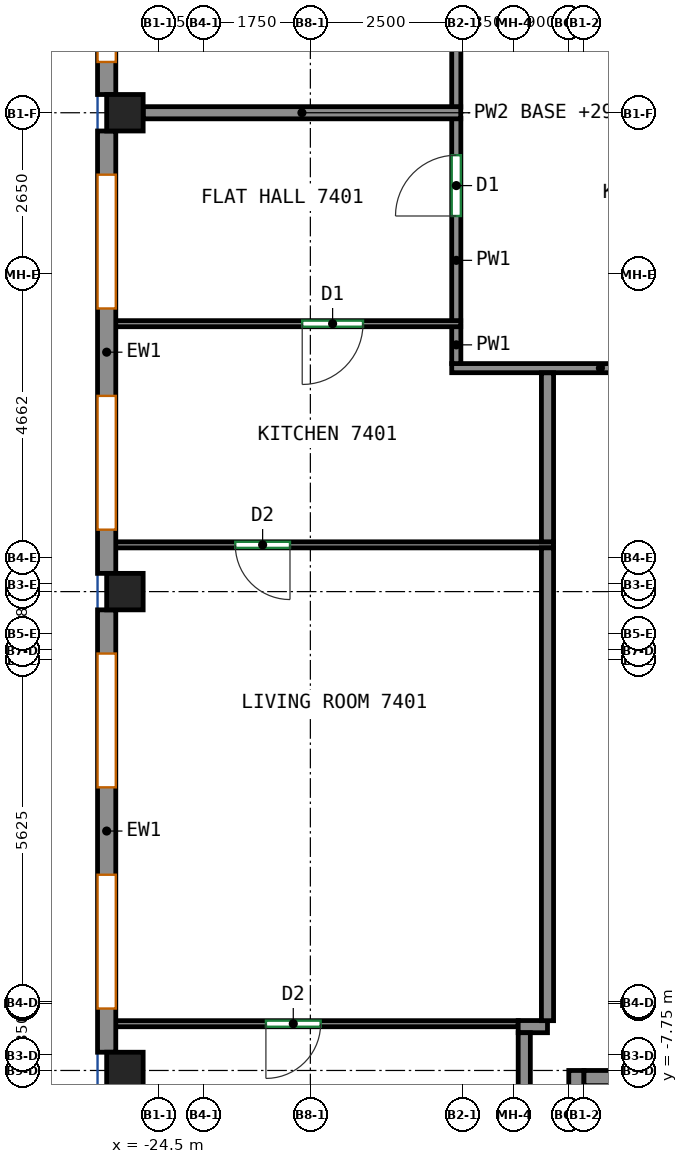
"""IFC4 building model, lengths in metres.
Left out: names, types, materials, properties, quantities, classifications, styles, units other than length and angle.
Written with IfcOpenShell. Run it as: python <this file> out.ifc"""

import sys

from ifc_helpers import new_model, si_unit, direction, frame, frame_2d, origin, origin_2d, place, context, subcontext, project, spatial, rectangle, extrude, source, transform, mapped, element, fill, save


model = new_model("IFC4")
c1 = context("Model", 3, precision=1e-05, world=origin(), true_north=direction((0.0, 1.0)))
c2 = subcontext(c1, "Body", "Model", "MODEL_VIEW")
j1 = project(units=[si_unit("LENGTHUNIT", "METRE"), si_unit("PLANEANGLEUNIT", "RADIAN")], contexts=[c1])
p1 = place(None, origin())
s1 = spatial("IfcSite", under=j1, at=p1, CompositionType="ELEMENT")
p2 = place(p1, origin())
s2 = spatial("IfcBuilding", under=s1, at=p2, CompositionType="ELEMENT")
p3 = place(p2, frame((0.0, 0.0, 298.4)))
s3 = spatial("IfcBuildingStorey", under=s2, at=p3, CompositionType="ELEMENT", Elevation=298.4)
m1 = source(origin(), c2, "Body", "SweptSolid", [
    extrude(rectangle(XDim=0.6, YDim=0.6, at=origin_2d()), origin(), (0.0, 0.0, 1.0), 3.12),
])
for number, where, z_axis, x_axis in (
    (1, (-25.05, -7.75, 0.0), (0.0, 0.0, 1.0), (1.0, 0.0, 0.0)),
    (2, (-25.05, 0.125, 0.0), (0.0, 0.0, 1.0), (1.0, 0.0, 0.0)),
    (3, (-25.05, 8.0, 0.0), (0.0, 0.0, 1.0), (1.0, 0.0, 0.0)),
):
    element("IfcColumn", number, at=place(p3, frame(where, z_axis=z_axis, x_axis=x_axis)), inside=s3, PredefinedType="COLUMN", context=c2, shape_type="MappedRepresentation", body=[
        mapped(m1, transform((0.0, 0.0, 0.0))),
    ])
m2 = source(origin(), c2, "Body", "SweptSolid", [
    extrude(rectangle(XDim=8.0, YDim=0.25, at=frame_2d((4.0, 0.0))), origin(), (0.0, 0.0, 1.0), 3.12),
])
p4 = place(p3, frame((-17.625, -15.75, 0.0), z_axis=(0.0, 0.0, 1.0), x_axis=(0.0, 1.0, 0.0)))
e4 = element("IfcWall", 4, at=p4, inside=s3, PredefinedType="SHEAR", context=c2, shape_type="MappedRepresentation", body=[
    mapped(m2, transform((0.0, 0.0, 0.0))),
])
m3 = source(origin(), c2, "Body", "SweptSolid", [
    extrude(rectangle(XDim=3.7, YDim=0.25, at=frame_2d((1.85, 0.0))), origin(), (0.0, 0.0, 1.0), 3.12),
])
p5 = place(p3, frame((-17.5, -7.875, 0.0), z_axis=(0.0, 0.0, 1.0), x_axis=(1.0, 0.0, 0.0)))
e5 = element("IfcWall", 5, at=p5, inside=s3, PredefinedType="SHEAR", context=c2, shape_type="MappedRepresentation", body=[
    mapped(m3, transform((0.0, 0.0, 0.0))),
])
m4 = source(origin(), c2, "Body", "SweptSolid", [
    extrude(rectangle(XDim=13.082, YDim=0.3, at=frame_2d((6.541, 0.0))), origin(), (0.0, 0.0, 1.0), 3.12),
])
p6 = place(p3, frame((-25.35, 21.382, 0.0), z_axis=(0.0, 0.0, 1.0), x_axis=(0.0, -1.0, 0.0)))
e6 = element("IfcWall", 6, at=p6, inside=s3, PredefinedType="SOLIDWALL", context=c2, shape_type="MappedRepresentation", body=[
    mapped(m4, transform((0.0, 0.0, 0.0))),
])
p7 = place(p6, frame((0.535, 0.0, 0.8)))
e7 = element("IfcOpeningElement", 7, at=p7, cuts=e6, PredefinedType="OPENING", context=c2, shape_type="SweptSolid", body=[
    extrude(rectangle(XDim=2.2, YDim=2.05, at=frame_2d((1.1, 1.025))), frame((0.0, 0.16, 0.0), z_axis=(0.0, -1.0, 0.0), x_axis=(1.0, 0.0, 0.0)), (0.0, 0.0, 1.0), 0.32),
])
p8 = place(p6, frame((3.806, 0.0, 0.8)))
e8 = element("IfcOpeningElement", 8, at=p8, cuts=e6, PredefinedType="OPENING", context=c2, shape_type="SweptSolid", body=[
    extrude(rectangle(XDim=2.2, YDim=2.05, at=frame_2d((1.1, 1.025))), frame((0.0, 0.16, 0.0), z_axis=(0.0, -1.0, 0.0), x_axis=(1.0, 0.0, 0.0)), (0.0, 0.0, 1.0), 0.32),
])
p9 = place(p6, frame((7.076, 0.0, 0.8)))
e9 = element("IfcOpeningElement", 9, at=p9, cuts=e6, PredefinedType="OPENING", context=c2, shape_type="SweptSolid", body=[
    extrude(rectangle(XDim=2.2, YDim=2.05, at=frame_2d((1.1, 1.025))), frame((0.0, 0.16, 0.0), z_axis=(0.0, -1.0, 0.0), x_axis=(1.0, 0.0, 0.0)), (0.0, 0.0, 1.0), 0.32),
])
p10 = place(p6, frame((10.347, 0.0, 0.8)))
e10 = element("IfcOpeningElement", 10, at=p10, cuts=e6, PredefinedType="OPENING", context=c2, shape_type="SweptSolid", body=[
    extrude(rectangle(XDim=2.2, YDim=2.05, at=frame_2d((1.1, 1.025))), frame((0.0, 0.16, 0.0), z_axis=(0.0, -1.0, 0.0), x_axis=(1.0, 0.0, 0.0)), (0.0, 0.0, 1.0), 0.32),
])
m5 = source(origin(), c2, "Body", "SweptSolid", [
    extrude(rectangle(XDim=7.275, YDim=0.3, at=frame_2d((3.637, 0.0))), origin(), (0.0, 0.0, 1.0), 3.12),
])
p11 = place(p3, frame((-25.35, 7.7, 0.0), z_axis=(0.0, 0.0, 1.0), x_axis=(0.0, -1.0, 0.0)))
e11 = element("IfcWall", 11, at=p11, inside=s3, PredefinedType="SOLIDWALL", context=c2, shape_type="MappedRepresentation", body=[
    mapped(m5, transform((0.0, 0.0, 0.0))),
])
p12 = place(p11, frame((0.719, 0.0, 0.8)))
e12 = element("IfcOpeningElement", 12, at=p12, cuts=e11, PredefinedType="OPENING", context=c2, shape_type="SweptSolid", body=[
    extrude(rectangle(XDim=2.2, YDim=2.05, at=frame_2d((1.1, 1.025))), frame((0.0, 0.16, 0.0), z_axis=(0.0, -1.0, 0.0), x_axis=(1.0, 0.0, 0.0)), (0.0, 0.0, 1.0), 0.32),
])
p13 = place(p11, frame((4.356, 0.0, 0.8)))
e13 = element("IfcOpeningElement", 13, at=p13, cuts=e11, PredefinedType="OPENING", context=c2, shape_type="SweptSolid", body=[
    extrude(rectangle(XDim=2.2, YDim=2.05, at=frame_2d((1.1, 1.025))), frame((0.0, 0.16, 0.0), z_axis=(0.0, -1.0, 0.0), x_axis=(1.0, 0.0, 0.0)), (0.0, 0.0, 1.0), 0.32),
])
p14 = place(p3, frame((-25.35, -0.175, 0.0), z_axis=(0.0, 0.0, 1.0), x_axis=(0.0, -1.0, 0.0)))
e14 = element("IfcWall", 14, at=p14, inside=s3, PredefinedType="SOLIDWALL", context=c2, shape_type="MappedRepresentation", body=[
    mapped(m5, transform((0.0, 0.0, 0.0))),
])
p15 = place(p14, frame((0.719, 0.0, 0.8)))
e15 = element("IfcOpeningElement", 15, at=p15, cuts=e14, PredefinedType="OPENING", context=c2, shape_type="SweptSolid", body=[
    extrude(rectangle(XDim=2.2, YDim=2.05, at=frame_2d((1.1, 1.025))), frame((0.0, 0.16, 0.0), z_axis=(0.0, -1.0, 0.0), x_axis=(1.0, 0.0, 0.0)), (0.0, 0.0, 1.0), 0.32),
])
p16 = place(p14, frame((4.356, 0.0, 0.8)))
e16 = element("IfcOpeningElement", 16, at=p16, cuts=e14, PredefinedType="OPENING", context=c2, shape_type="SweptSolid", body=[
    extrude(rectangle(XDim=2.2, YDim=2.05, at=frame_2d((1.1, 1.025))), frame((0.0, 0.16, 0.0), z_axis=(0.0, -1.0, 0.0), x_axis=(1.0, 0.0, 0.0)), (0.0, 0.0, 1.0), 0.32),
])
p17 = place(p3, frame((-19.675, 3.8, 0.0), z_axis=(0.0, 0.0, 1.0), x_axis=(1.0, 0.0, 0.0)))
e17 = element("IfcWall", 17, at=p17, inside=s3, PredefinedType="PARTITIONING", context=c2, shape_type="SweptSolid", body=[
    extrude(rectangle(XDim=4.89, YDim=0.15, at=frame_2d((2.445, 0.0))), origin(), (0.0, 0.0, 1.0), 3.12),
])
p18 = place(p3, frame((-19.6, 3.875, 0.0), z_axis=(0.0, 0.0, 1.0), x_axis=(0.0, 1.0, 0.0)))
e18 = element("IfcWall", 18, at=p18, inside=s3, PredefinedType="PARTITIONING", context=c2, shape_type="SweptSolid", body=[
    extrude(rectangle(XDim=0.616, YDim=0.15, at=frame_2d((0.308, 0.0))), origin(), (0.0, 0.0, 1.0), 3.12),
])
p19 = place(p3, frame((-19.6, 4.571, 0.0), z_axis=(0.0, 0.0, 1.0), x_axis=(0.0, 1.0, 0.0)))
e19 = element("IfcWall", 19, at=p19, inside=s3, PredefinedType="PARTITIONING", context=c2, shape_type="SweptSolid", body=[
    extrude(rectangle(XDim=3.339, YDim=0.15, at=frame_2d((1.669, 0.0))), origin(), (0.0, 0.0, 1.0), 3.12),
])
p20 = place(p19, frame((1.731, 0.0, 0.0)))
e20 = element("IfcOpeningElement", 20, at=p20, cuts=e19, PredefinedType="OPENING", context=c2, shape_type="SweptSolid", body=[
    extrude(rectangle(XDim=1.0, YDim=2.1, at=frame_2d((0.5, 1.05))), frame((0.0, 0.085, 0.0), z_axis=(0.0, -1.0, 0.0), x_axis=(1.0, 0.0, 0.0)), (0.0, 0.0, 1.0), 0.17),
])
p21 = place(p3, frame((-19.6, 8.09, 0.0), z_axis=(0.0, 0.0, 1.0), x_axis=(0.0, 1.0, 0.0)))
e21 = element("IfcWall", 21, at=p21, inside=s3, PredefinedType="PARTITIONING", context=c2, shape_type="SweptSolid", body=[
    extrude(rectangle(XDim=15.635, YDim=0.15, at=frame_2d((7.817, 0.0))), origin(), (0.0, 0.0, 1.0), 3.12),
])
p22 = place(p3, frame((-18.582, -6.981, 0.0), z_axis=(0.0, 0.0, 1.0), x_axis=(-1.0, 0.0, 0.0)))
e22 = element("IfcWall", 22, at=p22, inside=s3, PredefinedType="PARTITIONING", context=c2, shape_type="SweptSolid", body=[
    extrude(rectangle(XDim=6.668, YDim=0.1, at=frame_2d((3.334, 0.0))), origin(), (0.0, 0.0, 1.0), 3.12),
])
p23 = place(p22, frame((3.249, 0.0, 0.0)))
e23 = element("IfcOpeningElement", 23, at=p23, cuts=e22, PredefinedType="OPENING", context=c2, shape_type="SweptSolid", body=[
    extrude(rectangle(XDim=0.9, YDim=2.1, at=frame_2d((0.45, 1.05))), frame((0.0, 0.06, 0.0), z_axis=(0.0, -1.0, 0.0), x_axis=(1.0, 0.0, 0.0)), (0.0, 0.0, 1.0), 0.12),
])
p24 = place(p3, frame((-18.582, -7.029, 0.0), z_axis=(0.0, 0.0, 1.0), x_axis=(1.0, 0.0, 0.0)))
e24 = element("IfcWall", 24, at=p24, inside=s3, PredefinedType="PARTITIONING", context=c2, shape_type="SweptSolid", body=[
    extrude(rectangle(XDim=0.482, YDim=0.2, at=frame_2d((0.241, 0.0))), origin(), (0.0, 0.0, 1.0), 3.12),
])
p25 = place(p3, frame((-18.482, -9.902, 0.0), z_axis=(0.0, 0.0, 1.0), x_axis=(0.0, 1.0, 0.0)))
e25 = element("IfcWall", 25, at=p25, inside=s3, PredefinedType="PARTITIONING", context=c2, shape_type="SweptSolid", body=[
    extrude(rectangle(XDim=2.773, YDim=0.2, at=frame_2d((1.387, 0.0))), origin(), (0.0, 0.0, 1.0), 3.12),
])
p26 = place(p3, frame((-18.0, 0.894, 0.0), z_axis=(0.0, 0.0, 1.0), x_axis=(-1.0, 0.0, 0.0)))
e26 = element("IfcWall", 26, at=p26, inside=s3, PredefinedType="PARTITIONING", context=c2, shape_type="SweptSolid", body=[
    extrude(rectangle(XDim=7.25, YDim=0.1, at=frame_2d((3.625, 0.0))), origin(), (0.0, 0.0, 1.0), 3.12),
])
p27 = place(p26, frame((4.335, 0.0, 0.0)))
e27 = element("IfcOpeningElement", 27, at=p27, cuts=e26, PredefinedType="OPENING", context=c2, shape_type="SweptSolid", body=[
    extrude(rectangle(XDim=0.9, YDim=2.1, at=frame_2d((0.45, 1.05))), frame((0.0, 0.06, 0.0), z_axis=(0.0, -1.0, 0.0), x_axis=(1.0, 0.0, 0.0)), (0.0, 0.0, 1.0), 0.12),
])
p28 = place(p3, frame((-18.1, -6.931, 0.0), z_axis=(0.0, 0.0, 1.0), x_axis=(0.0, 1.0, 0.0)))
e28 = element("IfcWall", 28, at=p28, inside=s3, PredefinedType="PARTITIONING", context=c2, shape_type="SweptSolid", body=[
    extrude(rectangle(XDim=7.775, YDim=0.2, at=frame_2d((3.887, 0.0))), origin(), (0.0, 0.0, 1.0), 3.12),
])
p29 = place(p3, frame((-19.527, 4.531, 0.0), z_axis=(0.0, 0.0, 1.0), x_axis=(-1.0, 0.0, 0.0)))
e29 = element("IfcWall", 29, at=p29, inside=s3, PredefinedType="PARTITIONING", context=c2, shape_type="SweptSolid", body=[
    extrude(rectangle(XDim=5.723, YDim=0.1, at=frame_2d((2.861, 0.0))), origin(), (0.0, 0.0, 1.0), 3.12),
])
p30 = place(p29, frame((1.607, 0.0, 0.0)))
e30 = element("IfcOpeningElement", 30, at=p30, cuts=e29, PredefinedType="OPENING", context=c2, shape_type="SweptSolid", body=[
    extrude(rectangle(XDim=1.0, YDim=2.1, at=frame_2d((0.5, 1.05))), frame((0.0, 0.06, 0.0), z_axis=(0.0, -1.0, 0.0), x_axis=(1.0, 0.0, 0.0)), (0.0, 0.0, 1.0), 0.12),
])
p31 = place(p3, frame((-18.1, 0.944, 0.0), z_axis=(0.0, 0.0, 1.0), x_axis=(0.0, 1.0, 0.0)))
e31 = element("IfcWall", 31, at=p31, inside=s3, PredefinedType="PARTITIONING", context=c2, shape_type="SweptSolid", body=[
    extrude(rectangle(XDim=2.779, YDim=0.2, at=frame_2d((1.389, 0.0))), origin(), (0.0, 0.0, 1.0), 3.12),
])
p32 = place(p3, frame((-19.527, 8.0, 0.0), z_axis=(0.0, 0.0, 1.0), x_axis=(-1.0, 0.0, 0.0)))
e32 = element("IfcWall", 32, at=p32, inside=s3, PredefinedType="PARTITIONING", context=c2, shape_type="SweptSolid", body=[
    extrude(rectangle(XDim=5.223, YDim=0.2, at=frame_2d((2.611, 0.0))), origin(), (0.0, 0.0, 1.0), 2.57),
])
p33 = place(p10, origin())
e33 = element("IfcWindow", 33, at=p33, inside=s3, PartitioningType="SINGLE_PANEL", PredefinedType="WINDOW", context=c2, shape_type="SweptSolid", body=[
    extrude(rectangle(XDim=2.2, YDim=2.05, at=frame_2d((1.1, 1.025))), frame((0.0, 0.03, 0.0), z_axis=(0.0, -1.0, 0.0), x_axis=(1.0, 0.0, 0.0)), (0.0, 0.0, 1.0), 0.06),
])
fill(e10, e33)
p34 = place(p12, origin())
e34 = element("IfcWindow", 34, at=p34, inside=s3, PartitioningType="SINGLE_PANEL", PredefinedType="WINDOW", context=c2, shape_type="SweptSolid", body=[
    extrude(rectangle(XDim=2.2, YDim=2.05, at=frame_2d((1.1, 1.025))), frame((0.0, 0.03, 0.0), z_axis=(0.0, -1.0, 0.0), x_axis=(1.0, 0.0, 0.0)), (0.0, 0.0, 1.0), 0.06),
])
fill(e12, e34)
p35 = place(p13, origin())
e35 = element("IfcWindow", 35, at=p35, inside=s3, PartitioningType="SINGLE_PANEL", PredefinedType="WINDOW", context=c2, shape_type="SweptSolid", body=[
    extrude(rectangle(XDim=2.2, YDim=2.05, at=frame_2d((1.1, 1.025))), frame((0.0, 0.03, 0.0), z_axis=(0.0, -1.0, 0.0), x_axis=(1.0, 0.0, 0.0)), (0.0, 0.0, 1.0), 0.06),
])
fill(e13, e35)
p36 = place(p15, origin())
e36 = element("IfcWindow", 36, at=p36, inside=s3, PartitioningType="SINGLE_PANEL", PredefinedType="WINDOW", context=c2, shape_type="SweptSolid", body=[
    extrude(rectangle(XDim=2.2, YDim=2.05, at=frame_2d((1.1, 1.025))), frame((0.0, 0.03, 0.0), z_axis=(0.0, -1.0, 0.0), x_axis=(1.0, 0.0, 0.0)), (0.0, 0.0, 1.0), 0.06),
])
fill(e15, e36)
p37 = place(p16, origin())
e37 = element("IfcWindow", 37, at=p37, inside=s3, PartitioningType="SINGLE_PANEL", PredefinedType="WINDOW", context=c2, shape_type="SweptSolid", body=[
    extrude(rectangle(XDim=2.2, YDim=2.05, at=frame_2d((1.1, 1.025))), frame((0.0, 0.03, 0.0), z_axis=(0.0, -1.0, 0.0), x_axis=(1.0, 0.0, 0.0)), (0.0, 0.0, 1.0), 0.06),
])
fill(e16, e37)
p38 = place(p23, origin())
e38 = element("IfcDoor", 38, at=p38, inside=s3, OperationType="SINGLE_SWING_RIGHT", PredefinedType="DOOR", context=c2, shape_type="SweptSolid", body=[
    extrude(rectangle(XDim=0.9, YDim=2.1, at=frame_2d((0.45, 1.05))), frame((0.0, 0.025, 0.0), z_axis=(0.0, -1.0, 0.0), x_axis=(1.0, 0.0, 0.0)), (0.0, 0.0, 1.0), 0.05),
])
fill(e23, e38)
p39 = place(p27, origin())
e39 = element("IfcDoor", 39, at=p39, inside=s3, OperationType="SINGLE_SWING_LEFT", PredefinedType="DOOR", context=c2, shape_type="SweptSolid", body=[
    extrude(rectangle(XDim=0.9, YDim=2.1, at=frame_2d((0.45, 1.05))), frame((0.0, 0.025, 0.0), z_axis=(0.0, -1.0, 0.0), x_axis=(1.0, 0.0, 0.0)), (0.0, 0.0, 1.0), 0.05),
])
fill(e27, e39)
p40 = place(p30, origin())
e40 = element("IfcDoor", 40, at=p40, inside=s3, OperationType="SINGLE_SWING_RIGHT", PredefinedType="DOOR", context=c2, shape_type="SweptSolid", body=[
    extrude(rectangle(XDim=1.0, YDim=2.1, at=frame_2d((0.5, 1.05))), frame((0.0, 0.025, 0.0), z_axis=(0.0, -1.0, 0.0), x_axis=(1.0, 0.0, 0.0)), (0.0, 0.0, 1.0), 0.05),
])
fill(e30, e40)
p41 = place(p20, origin())
e41 = element("IfcDoor", 41, at=p41, inside=s3, OperationType="SINGLE_SWING_LEFT", PredefinedType="DOOR", context=c2, shape_type="SweptSolid", body=[
    extrude(rectangle(XDim=1.0, YDim=2.1, at=frame_2d((0.5, 1.05))), frame((0.0, 0.025, 0.0), z_axis=(0.0, -1.0, 0.0), x_axis=(1.0, 0.0, 0.0)), (0.0, 0.0, 1.0), 0.05),
])
fill(e20, e41)
save(model, sys.argv[1])
